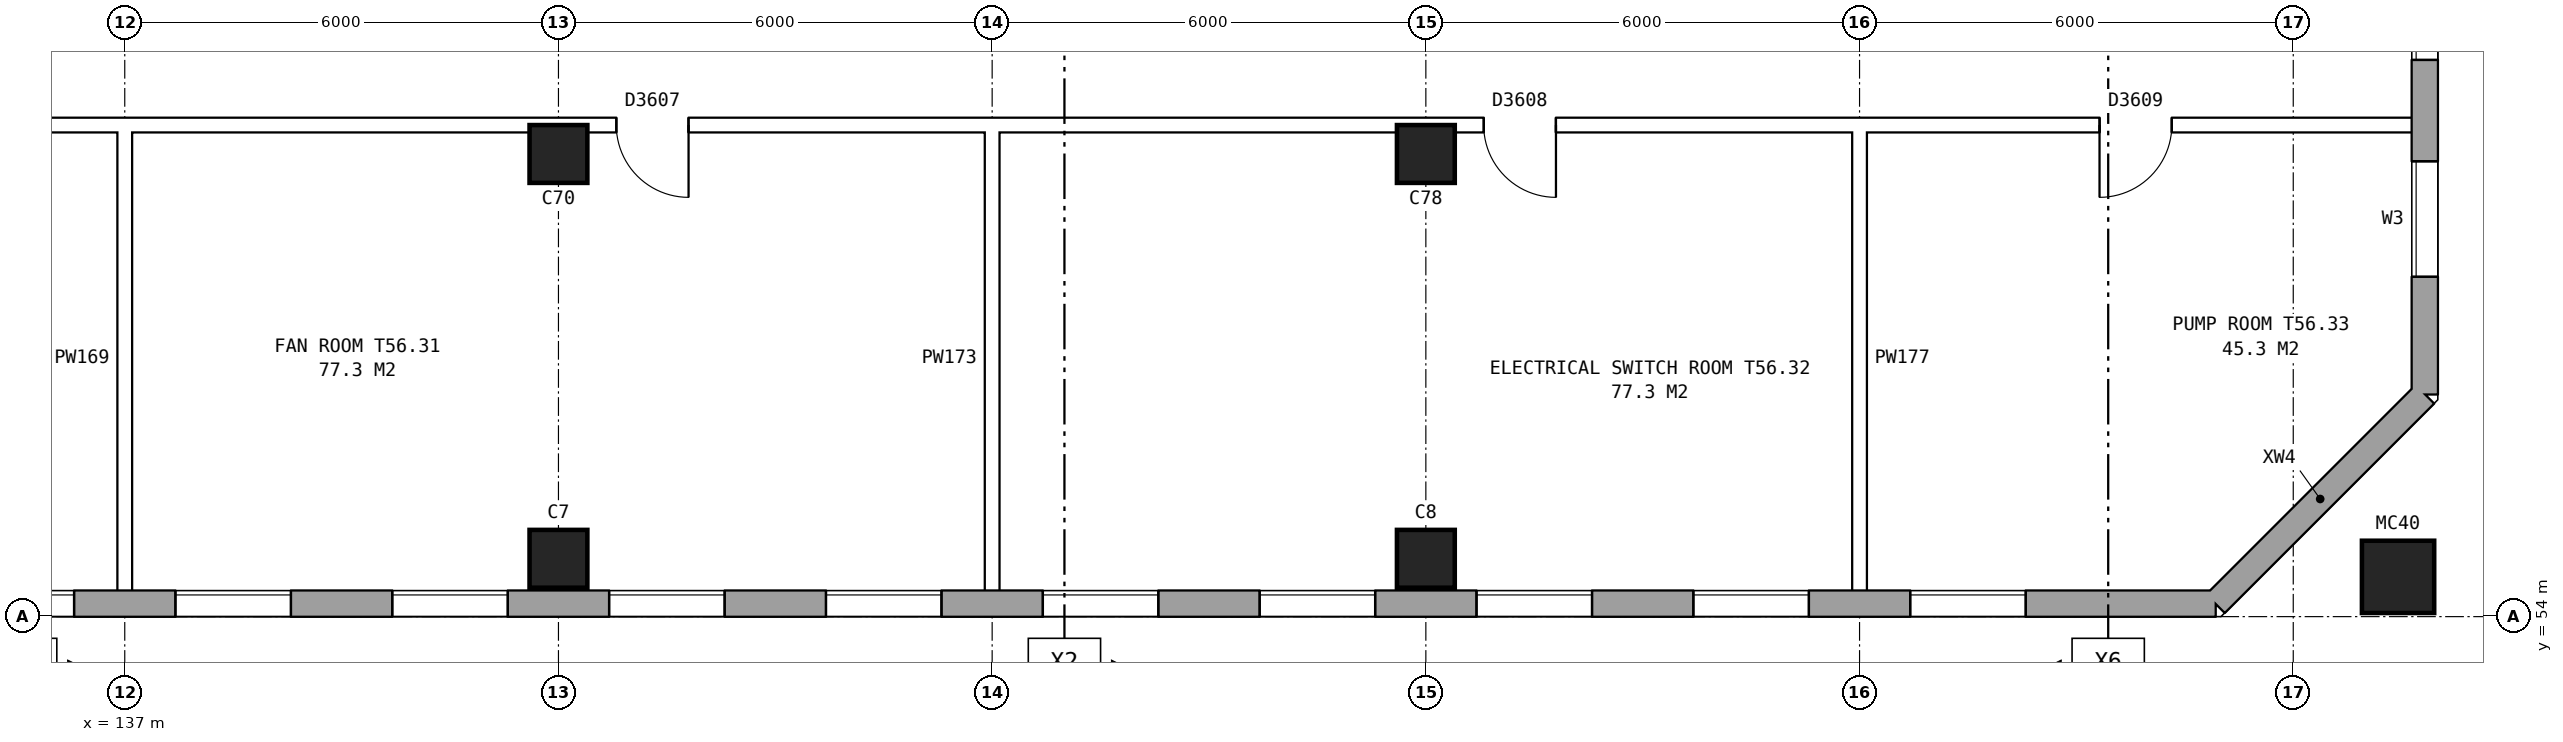
"""IFC4 building model, lengths in metres.
Left out: names, types, materials, properties, quantities, classifications, styles, units other than length and angle.
Written with IfcOpenShell. Run it as: python <this file> out.ifc"""

import sys

from ifc_helpers import new_model, si_unit, direction, frame, frame_2d, origin, origin_2d, place, context, subcontext, project, spatial, rectangle, hollow_rectangle, extrude, element, fill, save


model = new_model("IFC4")
c1 = context("Model", 3, precision=1e-05, world=origin(), true_north=direction((0.0, 1.0)))
c2 = subcontext(c1, "Body", "Model", "MODEL_VIEW")
j1 = project(units=[si_unit("LENGTHUNIT", "METRE"), si_unit("PLANEANGLEUNIT", "RADIAN")], contexts=[c1])
p1 = place(None, origin())
s1 = spatial("IfcSite", under=j1, at=p1, CompositionType="ELEMENT")
p2 = place(p1, origin())
s2 = spatial("IfcBuilding", under=s1, at=p2, CompositionType="ELEMENT")
p3 = place(p2, frame((0.0, 0.0, 198.6)))
s3 = spatial("IfcBuildingStorey", under=s2, at=p3, CompositionType="ELEMENT", Elevation=198.6)
for number, where, z_axis, x_axis in (
    (1, (143.0, 54.8, 0.0), (0.0, 0.0, 1.0), (1.0, 0.0, 0.0)),
    (2, (143.0, 60.4, 0.0), (0.0, 0.0, 1.0), (1.0, 0.0, 0.0)),
    (3, (155.0, 54.8, 0.0), (0.0, 0.0, 1.0), (1.0, 0.0, 0.0)),
    (4, (155.0, 60.4, 0.0), (0.0, 0.0, 1.0), (1.0, 0.0, 0.0)),
):
    element("IfcColumn", number, at=place(p3, frame(where, z_axis=z_axis, x_axis=x_axis)), inside=s3, PredefinedType="COLUMN", context=c2, shape_type="SweptSolid", body=[
        extrude(rectangle(XDim=0.8, YDim=0.8, at=origin_2d()), origin(), (0.0, 0.0, 1.0), 3.7),
    ])
p4 = place(p3, frame((168.45, 54.55, 0.0), z_axis=(0.0, 0.0, 1.0), x_axis=(1.0, 0.0, 0.0)))
e5 = element("IfcColumn", 5, at=p4, inside=s3, PredefinedType="COLUMN", context=c2, shape_type="SweptSolid", body=[
    extrude(hollow_rectangle(XDim=1.0, YDim=1.0, WallThickness=0.055, at=origin_2d()), origin(), (0.0, 0.0, 1.0), 4.2),
])
p5 = place(p3, frame((132.05, 54.18, 0.0), z_axis=(0.0, 0.0, 1.0), x_axis=(1.0, 0.0, 0.0)))
e6 = element("IfcWall", 6, at=p5, inside=s3, PredefinedType="STANDARD", context=c2, shape_type="SweptSolid", body=[
    extrude(rectangle(XDim=33.875, YDim=0.36, at=frame_2d((16.938, 0.0))), origin(), (0.0, 0.0, 1.0), 3.7),
])
p6 = place(p5, frame((2.65, 0.0, 1.5)))
e7 = element("IfcOpeningElement", 7, at=p6, cuts=e6, PredefinedType="OPENING", context=c2, shape_type="SweptSolid", body=[
    extrude(rectangle(XDim=1.6, YDim=1.2, at=frame_2d((0.8, 0.6))), frame((0.0, 0.19, 0.0), z_axis=(0.0, -1.0, 0.0), x_axis=(1.0, 0.0, 0.0)), (0.0, 0.0, 1.0), 0.38),
])
p7 = place(p5, frame((5.65, 0.0, 1.5)))
e8 = element("IfcOpeningElement", 8, at=p7, cuts=e6, PredefinedType="OPENING", context=c2, shape_type="SweptSolid", body=[
    extrude(rectangle(XDim=1.6, YDim=1.2, at=frame_2d((0.8, 0.6))), frame((0.0, 0.19, 0.0), z_axis=(0.0, -1.0, 0.0), x_axis=(1.0, 0.0, 0.0)), (0.0, 0.0, 1.0), 0.38),
])
p8 = place(p5, frame((8.65, 0.0, 1.5)))
e9 = element("IfcOpeningElement", 9, at=p8, cuts=e6, PredefinedType="OPENING", context=c2, shape_type="SweptSolid", body=[
    extrude(rectangle(XDim=1.6, YDim=1.2, at=frame_2d((0.8, 0.6))), frame((0.0, 0.19, 0.0), z_axis=(0.0, -1.0, 0.0), x_axis=(1.0, 0.0, 0.0)), (0.0, 0.0, 1.0), 0.38),
])
p9 = place(p5, frame((11.65, 0.0, 1.5)))
e10 = element("IfcOpeningElement", 10, at=p9, cuts=e6, PredefinedType="OPENING", context=c2, shape_type="SweptSolid", body=[
    extrude(rectangle(XDim=1.6, YDim=1.2, at=frame_2d((0.8, 0.6))), frame((0.0, 0.19, 0.0), z_axis=(0.0, -1.0, 0.0), x_axis=(1.0, 0.0, 0.0)), (0.0, 0.0, 1.0), 0.38),
])
p10 = place(p5, frame((14.65, 0.0, 1.5)))
e11 = element("IfcOpeningElement", 11, at=p10, cuts=e6, PredefinedType="OPENING", context=c2, shape_type="SweptSolid", body=[
    extrude(rectangle(XDim=1.6, YDim=1.2, at=frame_2d((0.8, 0.6))), frame((0.0, 0.19, 0.0), z_axis=(0.0, -1.0, 0.0), x_axis=(1.0, 0.0, 0.0)), (0.0, 0.0, 1.0), 0.38),
])
p11 = place(p5, frame((17.65, 0.0, 1.5)))
e12 = element("IfcOpeningElement", 12, at=p11, cuts=e6, PredefinedType="OPENING", context=c2, shape_type="SweptSolid", body=[
    extrude(rectangle(XDim=1.6, YDim=1.2, at=frame_2d((0.8, 0.6))), frame((0.0, 0.19, 0.0), z_axis=(0.0, -1.0, 0.0), x_axis=(1.0, 0.0, 0.0)), (0.0, 0.0, 1.0), 0.38),
])
p12 = place(p5, frame((20.65, 0.0, 1.5)))
e13 = element("IfcOpeningElement", 13, at=p12, cuts=e6, PredefinedType="OPENING", context=c2, shape_type="SweptSolid", body=[
    extrude(rectangle(XDim=1.6, YDim=1.2, at=frame_2d((0.8, 0.6))), frame((0.0, 0.19, 0.0), z_axis=(0.0, -1.0, 0.0), x_axis=(1.0, 0.0, 0.0)), (0.0, 0.0, 1.0), 0.38),
])
p13 = place(p5, frame((23.65, 0.0, 1.5)))
e14 = element("IfcOpeningElement", 14, at=p13, cuts=e6, PredefinedType="OPENING", context=c2, shape_type="SweptSolid", body=[
    extrude(rectangle(XDim=1.6, YDim=1.2, at=frame_2d((0.8, 0.6))), frame((0.0, 0.19, 0.0), z_axis=(0.0, -1.0, 0.0), x_axis=(1.0, 0.0, 0.0)), (0.0, 0.0, 1.0), 0.38),
])
p14 = place(p5, frame((26.65, 0.0, 1.5)))
e15 = element("IfcOpeningElement", 15, at=p14, cuts=e6, PredefinedType="OPENING", context=c2, shape_type="SweptSolid", body=[
    extrude(rectangle(XDim=1.6, YDim=1.2, at=frame_2d((0.8, 0.6))), frame((0.0, 0.19, 0.0), z_axis=(0.0, -1.0, 0.0), x_axis=(1.0, 0.0, 0.0)), (0.0, 0.0, 1.0), 0.38),
])
p15 = place(p5, frame((29.65, 0.0, 1.5)))
e16 = element("IfcOpeningElement", 16, at=p15, cuts=e6, PredefinedType="OPENING", context=c2, shape_type="SweptSolid", body=[
    extrude(rectangle(XDim=1.6, YDim=1.2, at=frame_2d((0.8, 0.6))), frame((0.0, 0.19, 0.0), z_axis=(0.0, -1.0, 0.0), x_axis=(1.0, 0.0, 0.0)), (0.0, 0.0, 1.0), 0.38),
])
p16 = place(p3, frame((165.925, 54.18, 0.0), z_axis=(0.0, 0.0, 1.0), x_axis=(0.707106781187, 0.707106781187, 0.0)))
e17 = element("IfcWall", 17, at=p16, inside=s3, PredefinedType="STANDARD", context=c2, shape_type="SweptSolid", body=[
    extrude(rectangle(XDim=4.094, YDim=0.36, at=frame_2d((2.047, 0.0))), origin(), (0.0, 0.0, 1.0), 3.7),
])
p17 = place(p3, frame((168.82, 57.075, 0.0), z_axis=(0.0, 0.0, 1.0), x_axis=(0.0, 1.0, 0.0)))
e18 = element("IfcWall", 18, at=p17, inside=s3, PredefinedType="STANDARD", context=c2, shape_type="SweptSolid", body=[
    extrude(rectangle(XDim=25.851, YDim=0.36, at=frame_2d((12.925, 0.0))), origin(), (0.0, 0.0, 1.0), 3.7),
])
p18 = place(p17, frame((1.625, 0.0, 1.5)))
e19 = element("IfcOpeningElement", 19, at=p18, cuts=e18, PredefinedType="OPENING", context=c2, shape_type="SweptSolid", body=[
    extrude(rectangle(XDim=1.6, YDim=1.2, at=frame_2d((0.8, 0.6))), frame((0.0, 0.19, 0.0), z_axis=(0.0, -1.0, 0.0), x_axis=(1.0, 0.0, 0.0)), (0.0, 0.0, 1.0), 0.38),
])
p19 = place(p17, frame((4.625, 0.0, 1.5)))
e20 = element("IfcOpeningElement", 20, at=p19, cuts=e18, PredefinedType="OPENING", context=c2, shape_type="SweptSolid", body=[
    extrude(rectangle(XDim=1.6, YDim=1.2, at=frame_2d((0.8, 0.6))), frame((0.0, 0.19, 0.0), z_axis=(0.0, -1.0, 0.0), x_axis=(1.0, 0.0, 0.0)), (0.0, 0.0, 1.0), 0.38),
])
p20 = place(p17, frame((19.625, 0.0, 1.5)))
e21 = element("IfcOpeningElement", 21, at=p20, cuts=e18, PredefinedType="OPENING", context=c2, shape_type="SweptSolid", body=[
    extrude(rectangle(XDim=1.6, YDim=1.2, at=frame_2d((0.8, 0.6))), frame((0.0, 0.19, 0.0), z_axis=(0.0, -1.0, 0.0), x_axis=(1.0, 0.0, 0.0)), (0.0, 0.0, 1.0), 0.38),
])
p21 = place(p17, frame((22.625, 0.0, 1.5)))
e22 = element("IfcOpeningElement", 22, at=p21, cuts=e18, PredefinedType="OPENING", context=c2, shape_type="SweptSolid", body=[
    extrude(rectangle(XDim=1.6, YDim=1.2, at=frame_2d((0.8, 0.6))), frame((0.0, 0.19, 0.0), z_axis=(0.0, -1.0, 0.0), x_axis=(1.0, 0.0, 0.0)), (0.0, 0.0, 1.0), 0.38),
])
p22 = place(p3, frame((32.24, 60.8, 0.0), z_axis=(0.0, 0.0, 1.0), x_axis=(1.0, 0.0, 0.0)))
e23 = element("IfcWall", 23, at=p22, inside=s3, PredefinedType="PARTITIONING", context=c2, shape_type="SweptSolid", body=[
    extrude(rectangle(XDim=136.52, YDim=0.2, at=frame_2d((68.26, 0.0))), origin(), (0.0, 0.0, 1.0), 3.7),
])
p23 = place(p22, frame((1.94, 0.0, 0.0)))
e24 = element("IfcOpeningElement", 24, at=p23, cuts=e23, PredefinedType="OPENING", context=c2, shape_type="SweptSolid", body=[
    extrude(rectangle(XDim=1.0, YDim=2.1, at=frame_2d((0.5, 1.05))), frame((0.0, 0.11, 0.0), z_axis=(0.0, -1.0, 0.0), x_axis=(1.0, 0.0, 0.0)), (0.0, 0.0, 1.0), 0.22),
])
p24 = place(p22, frame((8.76, 0.0, 0.0)))
e25 = element("IfcOpeningElement", 25, at=p24, cuts=e23, PredefinedType="OPENING", context=c2, shape_type="SweptSolid", body=[
    extrude(rectangle(XDim=1.0, YDim=2.1, at=frame_2d((0.5, 1.05))), frame((0.0, 0.11, 0.0), z_axis=(0.0, -1.0, 0.0), x_axis=(1.0, 0.0, 0.0)), (0.0, 0.0, 1.0), 0.22),
])
p25 = place(p22, frame((20.46, 0.0, 0.0)))
e26 = element("IfcOpeningElement", 26, at=p25, cuts=e23, PredefinedType="OPENING", context=c2, shape_type="SweptSolid", body=[
    extrude(rectangle(XDim=1.0, YDim=2.1, at=frame_2d((0.5, 1.05))), frame((0.0, 0.11, 0.0), z_axis=(0.0, -1.0, 0.0), x_axis=(1.0, 0.0, 0.0)), (0.0, 0.0, 1.0), 0.22),
])
p26 = place(p22, frame((30.06, 0.0, 0.0)))
e27 = element("IfcOpeningElement", 27, at=p26, cuts=e23, PredefinedType="OPENING", context=c2, shape_type="SweptSolid", body=[
    extrude(rectangle(XDim=1.0, YDim=2.1, at=frame_2d((0.5, 1.05))), frame((0.0, 0.11, 0.0), z_axis=(0.0, -1.0, 0.0), x_axis=(1.0, 0.0, 0.0)), (0.0, 0.0, 1.0), 0.22),
])
p27 = place(p22, frame((40.08, 0.0, 0.0)))
e28 = element("IfcOpeningElement", 28, at=p27, cuts=e23, PredefinedType="OPENING", context=c2, shape_type="SweptSolid", body=[
    extrude(rectangle(XDim=1.0, YDim=2.1, at=frame_2d((0.5, 1.05))), frame((0.0, 0.11, 0.0), z_axis=(0.0, -1.0, 0.0), x_axis=(1.0, 0.0, 0.0)), (0.0, 0.0, 1.0), 0.22),
])
p28 = place(p22, frame((46.517, 0.0, 0.0)))
e29 = element("IfcOpeningElement", 29, at=p28, cuts=e23, PredefinedType="OPENING", context=c2, shape_type="SweptSolid", body=[
    extrude(rectangle(XDim=1.0, YDim=2.1, at=frame_2d((0.5, 1.05))), frame((0.0, 0.11, 0.0), z_axis=(0.0, -1.0, 0.0), x_axis=(1.0, 0.0, 0.0)), (0.0, 0.0, 1.0), 0.22),
])
p29 = place(p22, frame((57.01, 0.0, 0.0)))
e30 = element("IfcOpeningElement", 30, at=p29, cuts=e23, PredefinedType="OPENING", context=c2, shape_type="SweptSolid", body=[
    extrude(rectangle(XDim=1.0, YDim=2.1, at=frame_2d((0.5, 1.05))), frame((0.0, 0.11, 0.0), z_axis=(0.0, -1.0, 0.0), x_axis=(1.0, 0.0, 0.0)), (0.0, 0.0, 1.0), 0.22),
])
p30 = place(p22, frame((70.76, 0.0, 0.0)))
e31 = element("IfcOpeningElement", 31, at=p30, cuts=e23, PredefinedType="OPENING", context=c2, shape_type="SweptSolid", body=[
    extrude(rectangle(XDim=1.0, YDim=2.1, at=frame_2d((0.5, 1.05))), frame((0.0, 0.11, 0.0), z_axis=(0.0, -1.0, 0.0), x_axis=(1.0, 0.0, 0.0)), (0.0, 0.0, 1.0), 0.22),
])
p31 = place(p22, frame((84.51, 0.0, 0.0)))
e32 = element("IfcOpeningElement", 32, at=p31, cuts=e23, PredefinedType="OPENING", context=c2, shape_type="SweptSolid", body=[
    extrude(rectangle(XDim=1.0, YDim=2.1, at=frame_2d((0.5, 1.05))), frame((0.0, 0.11, 0.0), z_axis=(0.0, -1.0, 0.0), x_axis=(1.0, 0.0, 0.0)), (0.0, 0.0, 1.0), 0.22),
])
p32 = place(p22, frame((95.003, 0.0, 0.0)))
e33 = element("IfcOpeningElement", 33, at=p32, cuts=e23, PredefinedType="OPENING", context=c2, shape_type="SweptSolid", body=[
    extrude(rectangle(XDim=1.0, YDim=2.1, at=frame_2d((0.5, 1.05))), frame((0.0, 0.11, 0.0), z_axis=(0.0, -1.0, 0.0), x_axis=(1.0, 0.0, 0.0)), (0.0, 0.0, 1.0), 0.22),
])
p33 = place(p22, frame((101.44, 0.0, 0.0)))
e34 = element("IfcOpeningElement", 34, at=p33, cuts=e23, PredefinedType="OPENING", context=c2, shape_type="SweptSolid", body=[
    extrude(rectangle(XDim=1.0, YDim=2.1, at=frame_2d((0.5, 1.05))), frame((0.0, 0.11, 0.0), z_axis=(0.0, -1.0, 0.0), x_axis=(1.0, 0.0, 0.0)), (0.0, 0.0, 1.0), 0.22),
])
p34 = place(p22, frame((111.56, 0.0, 0.0)))
e35 = element("IfcOpeningElement", 35, at=p34, cuts=e23, PredefinedType="OPENING", context=c2, shape_type="SweptSolid", body=[
    extrude(rectangle(XDim=1.0, YDim=2.1, at=frame_2d((0.5, 1.05))), frame((0.0, 0.11, 0.0), z_axis=(0.0, -1.0, 0.0), x_axis=(1.0, 0.0, 0.0)), (0.0, 0.0, 1.0), 0.22),
])
p35 = place(p22, frame((123.56, 0.0, 0.0)))
e36 = element("IfcOpeningElement", 36, at=p35, cuts=e23, PredefinedType="OPENING", context=c2, shape_type="SweptSolid", body=[
    extrude(rectangle(XDim=1.0, YDim=2.1, at=frame_2d((0.5, 1.05))), frame((0.0, 0.11, 0.0), z_axis=(0.0, -1.0, 0.0), x_axis=(1.0, 0.0, 0.0)), (0.0, 0.0, 1.0), 0.22),
])
p36 = place(p22, frame((132.08, 0.0, 0.0)))
e37 = element("IfcOpeningElement", 37, at=p36, cuts=e23, PredefinedType="OPENING", context=c2, shape_type="SweptSolid", body=[
    extrude(rectangle(XDim=1.0, YDim=2.1, at=frame_2d((0.5, 1.05))), frame((0.0, 0.11, 0.0), z_axis=(0.0, -1.0, 0.0), x_axis=(1.0, 0.0, 0.0)), (0.0, 0.0, 1.0), 0.22),
])
for number, where, z_axis, x_axis in (
    (38, (137.0, 54.24, 0.0), (0.0, 0.0, 1.0), (0.0, 1.0, 0.0)),
    (39, (149.0, 54.24, 0.0), (0.0, 0.0, 1.0), (0.0, 1.0, 0.0)),
    (40, (161.0, 54.24, 0.0), (0.0, 0.0, 1.0), (0.0, 1.0, 0.0)),
):
    element("IfcWall", number, at=place(p3, frame(where, z_axis=z_axis, x_axis=x_axis)), inside=s3, PredefinedType="PARTITIONING", context=c2, shape_type="SweptSolid", body=[
        extrude(rectangle(XDim=6.66, YDim=0.2, at=frame_2d((3.33, 0.0))), origin(), (0.0, 0.0, 1.0), 3.7),
    ])
p37 = place(p6, origin())
e41 = element("IfcWindow", 41, at=p37, inside=s3, PartitioningType="DOUBLE_PANEL_HORIZONTAL", PredefinedType="WINDOW", context=c2, shape_type="SweptSolid", body=[
    extrude(rectangle(XDim=1.6, YDim=1.2, at=frame_2d((0.8, 0.6))), frame((0.0, 0.15, 0.0), z_axis=(0.0, -1.0, 0.0), x_axis=(1.0, 0.0, 0.0)), (0.0, 0.0, 1.0), 0.06),
])
fill(e7, e41)
p38 = place(p7, origin())
e42 = element("IfcWindow", 42, at=p38, inside=s3, PartitioningType="DOUBLE_PANEL_HORIZONTAL", PredefinedType="WINDOW", context=c2, shape_type="SweptSolid", body=[
    extrude(rectangle(XDim=1.6, YDim=1.2, at=frame_2d((0.8, 0.6))), frame((0.0, 0.15, 0.0), z_axis=(0.0, -1.0, 0.0), x_axis=(1.0, 0.0, 0.0)), (0.0, 0.0, 1.0), 0.06),
])
fill(e8, e42)
p39 = place(p8, origin())
e43 = element("IfcWindow", 43, at=p39, inside=s3, PartitioningType="DOUBLE_PANEL_HORIZONTAL", PredefinedType="WINDOW", context=c2, shape_type="SweptSolid", body=[
    extrude(rectangle(XDim=1.6, YDim=1.2, at=frame_2d((0.8, 0.6))), frame((0.0, 0.15, 0.0), z_axis=(0.0, -1.0, 0.0), x_axis=(1.0, 0.0, 0.0)), (0.0, 0.0, 1.0), 0.06),
])
fill(e9, e43)
p40 = place(p9, origin())
e44 = element("IfcWindow", 44, at=p40, inside=s3, PartitioningType="DOUBLE_PANEL_HORIZONTAL", PredefinedType="WINDOW", context=c2, shape_type="SweptSolid", body=[
    extrude(rectangle(XDim=1.6, YDim=1.2, at=frame_2d((0.8, 0.6))), frame((0.0, 0.15, 0.0), z_axis=(0.0, -1.0, 0.0), x_axis=(1.0, 0.0, 0.0)), (0.0, 0.0, 1.0), 0.06),
])
fill(e10, e44)
p41 = place(p10, origin())
e45 = element("IfcWindow", 45, at=p41, inside=s3, PartitioningType="DOUBLE_PANEL_HORIZONTAL", PredefinedType="WINDOW", context=c2, shape_type="SweptSolid", body=[
    extrude(rectangle(XDim=1.6, YDim=1.2, at=frame_2d((0.8, 0.6))), frame((0.0, 0.15, 0.0), z_axis=(0.0, -1.0, 0.0), x_axis=(1.0, 0.0, 0.0)), (0.0, 0.0, 1.0), 0.06),
])
fill(e11, e45)
p42 = place(p11, origin())
e46 = element("IfcWindow", 46, at=p42, inside=s3, PartitioningType="DOUBLE_PANEL_HORIZONTAL", PredefinedType="WINDOW", context=c2, shape_type="SweptSolid", body=[
    extrude(rectangle(XDim=1.6, YDim=1.2, at=frame_2d((0.8, 0.6))), frame((0.0, 0.15, 0.0), z_axis=(0.0, -1.0, 0.0), x_axis=(1.0, 0.0, 0.0)), (0.0, 0.0, 1.0), 0.06),
])
fill(e12, e46)
p43 = place(p12, origin())
e47 = element("IfcWindow", 47, at=p43, inside=s3, PartitioningType="DOUBLE_PANEL_HORIZONTAL", PredefinedType="WINDOW", context=c2, shape_type="SweptSolid", body=[
    extrude(rectangle(XDim=1.6, YDim=1.2, at=frame_2d((0.8, 0.6))), frame((0.0, 0.15, 0.0), z_axis=(0.0, -1.0, 0.0), x_axis=(1.0, 0.0, 0.0)), (0.0, 0.0, 1.0), 0.06),
])
fill(e13, e47)
p44 = place(p13, origin())
e48 = element("IfcWindow", 48, at=p44, inside=s3, PartitioningType="DOUBLE_PANEL_HORIZONTAL", PredefinedType="WINDOW", context=c2, shape_type="SweptSolid", body=[
    extrude(rectangle(XDim=1.6, YDim=1.2, at=frame_2d((0.8, 0.6))), frame((0.0, 0.15, 0.0), z_axis=(0.0, -1.0, 0.0), x_axis=(1.0, 0.0, 0.0)), (0.0, 0.0, 1.0), 0.06),
])
fill(e14, e48)
p45 = place(p14, origin())
e49 = element("IfcWindow", 49, at=p45, inside=s3, PartitioningType="DOUBLE_PANEL_HORIZONTAL", PredefinedType="WINDOW", context=c2, shape_type="SweptSolid", body=[
    extrude(rectangle(XDim=1.6, YDim=1.2, at=frame_2d((0.8, 0.6))), frame((0.0, 0.15, 0.0), z_axis=(0.0, -1.0, 0.0), x_axis=(1.0, 0.0, 0.0)), (0.0, 0.0, 1.0), 0.06),
])
fill(e15, e49)
p46 = place(p15, origin())
e50 = element("IfcWindow", 50, at=p46, inside=s3, PartitioningType="DOUBLE_PANEL_HORIZONTAL", PredefinedType="WINDOW", context=c2, shape_type="SweptSolid", body=[
    extrude(rectangle(XDim=1.6, YDim=1.2, at=frame_2d((0.8, 0.6))), frame((0.0, 0.15, 0.0), z_axis=(0.0, -1.0, 0.0), x_axis=(1.0, 0.0, 0.0)), (0.0, 0.0, 1.0), 0.06),
])
fill(e16, e50)
p47 = place(p18, origin())
e51 = element("IfcWindow", 51, at=p47, inside=s3, PartitioningType="DOUBLE_PANEL_HORIZONTAL", PredefinedType="WINDOW", context=c2, shape_type="SweptSolid", body=[
    extrude(rectangle(XDim=1.6, YDim=1.2, at=frame_2d((0.8, 0.6))), frame((0.0, 0.15, 0.0), z_axis=(0.0, -1.0, 0.0), x_axis=(1.0, 0.0, 0.0)), (0.0, 0.0, 1.0), 0.06),
])
fill(e19, e51)
p48 = place(p19, origin())
e52 = element("IfcWindow", 52, at=p48, inside=s3, PartitioningType="DOUBLE_PANEL_HORIZONTAL", PredefinedType="WINDOW", context=c2, shape_type="SweptSolid", body=[
    extrude(rectangle(XDim=1.6, YDim=1.2, at=frame_2d((0.8, 0.6))), frame((0.0, 0.15, 0.0), z_axis=(0.0, -1.0, 0.0), x_axis=(1.0, 0.0, 0.0)), (0.0, 0.0, 1.0), 0.06),
])
fill(e20, e52)
p49 = place(p34, frame((1.0, 0.0, 0.0), z_axis=(0.0, 0.0, 1.0), x_axis=(-1.0, 0.0, 0.0)))
e53 = element("IfcDoor", 53, at=p49, inside=s3, OperationType="SINGLE_SWING_LEFT", PredefinedType="DOOR", context=c2, shape_type="SweptSolid", body=[
    extrude(rectangle(XDim=1.0, YDim=2.1, at=frame_2d((0.5, 1.05))), frame((0.0, 0.025, 0.0), z_axis=(0.0, -1.0, 0.0), x_axis=(1.0, 0.0, 0.0)), (0.0, 0.0, 1.0), 0.05),
])
fill(e35, e53)
p50 = place(p35, frame((1.0, 0.0, 0.0), z_axis=(0.0, 0.0, 1.0), x_axis=(-1.0, 0.0, 0.0)))
e54 = element("IfcDoor", 54, at=p50, inside=s3, OperationType="SINGLE_SWING_LEFT", PredefinedType="DOOR", context=c2, shape_type="SweptSolid", body=[
    extrude(rectangle(XDim=1.0, YDim=2.1, at=frame_2d((0.5, 1.05))), frame((0.0, 0.025, 0.0), z_axis=(0.0, -1.0, 0.0), x_axis=(1.0, 0.0, 0.0)), (0.0, 0.0, 1.0), 0.05),
])
fill(e36, e54)
p51 = place(p36, frame((1.0, 0.0, 0.0), z_axis=(0.0, 0.0, 1.0), x_axis=(-1.0, 0.0, 0.0)))
e55 = element("IfcDoor", 55, at=p51, inside=s3, OperationType="SINGLE_SWING_RIGHT", PredefinedType="DOOR", context=c2, shape_type="SweptSolid", body=[
    extrude(rectangle(XDim=1.0, YDim=2.1, at=frame_2d((0.5, 1.05))), frame((0.0, 0.025, 0.0), z_axis=(0.0, -1.0, 0.0), x_axis=(1.0, 0.0, 0.0)), (0.0, 0.0, 1.0), 0.05),
])
fill(e37, e55)
save(model, sys.argv[1])
